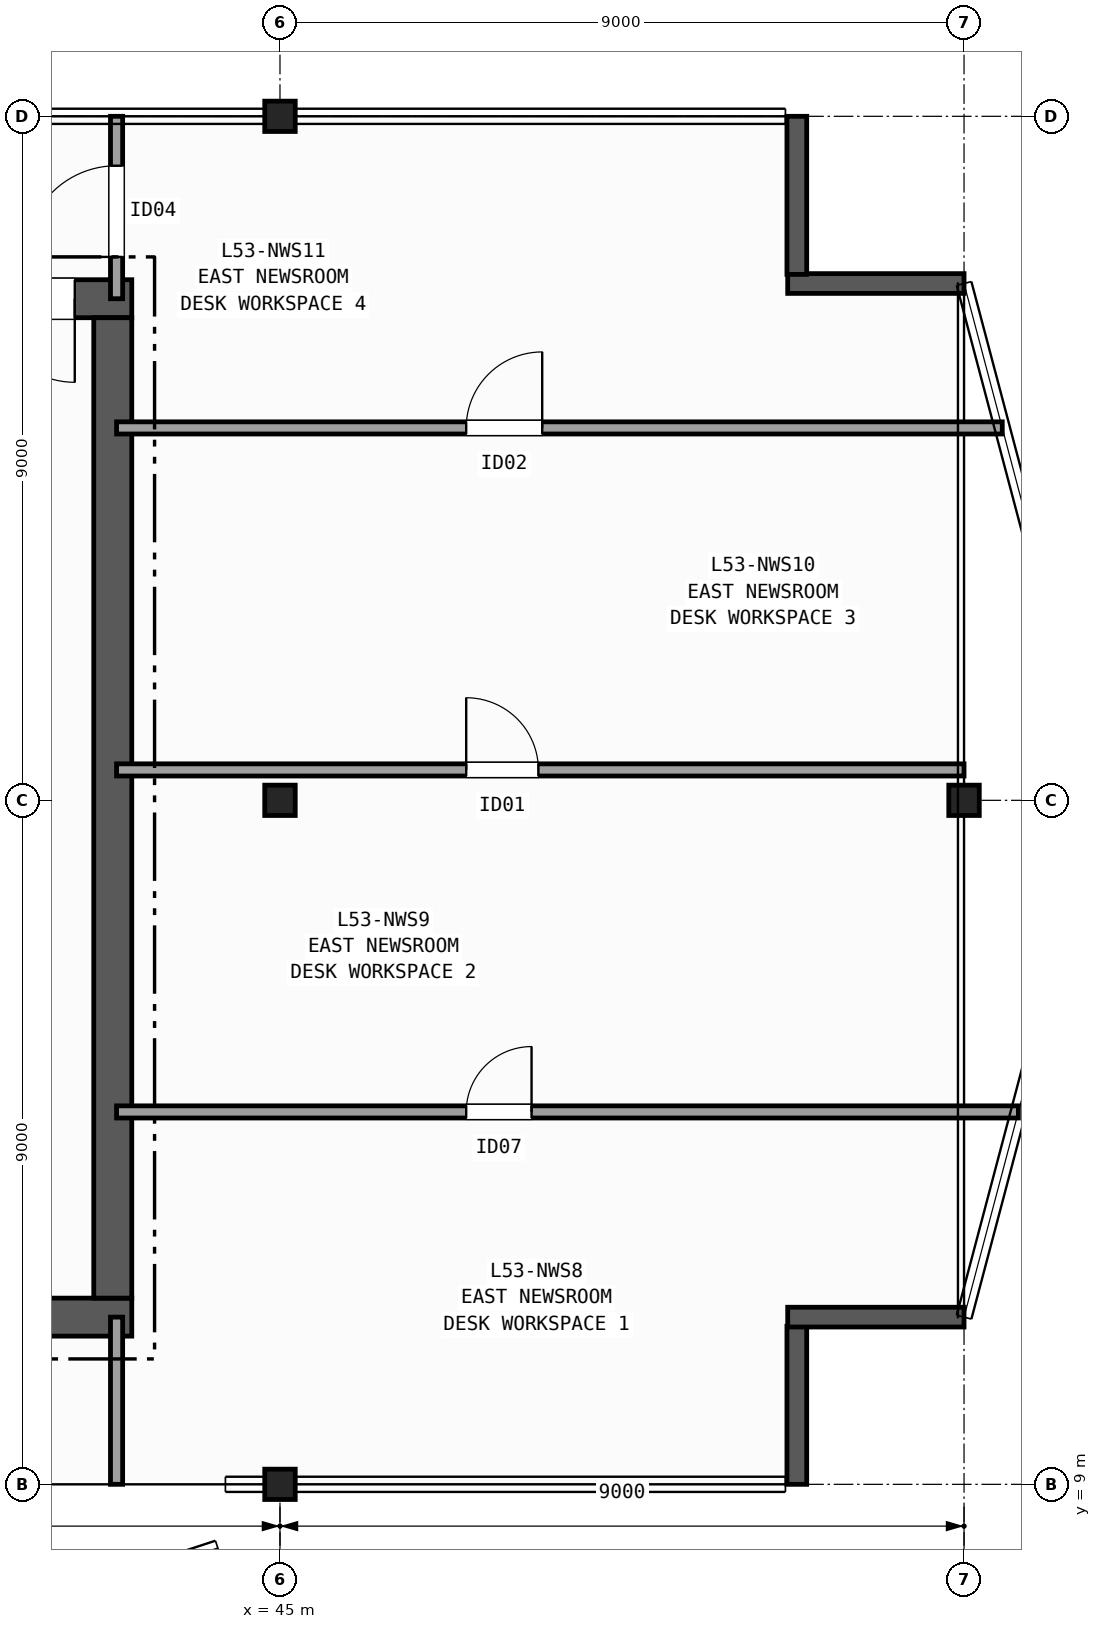
"""IFC4 building model, lengths in metres.
Left out: names, types, materials, properties, quantities, classifications, styles, units other than length and angle.
Written with IfcOpenShell. Run it as: python <this file> out.ifc"""

import sys

from ifc_helpers import new_model, si_unit, direction, frame, frame_2d, origin, origin_2d, place, context, subcontext, project, spatial, rectangle, i_section, extrude, element, fill, save


model = new_model("IFC4")
c1 = context("Model", 3, precision=1e-05, world=origin(), true_north=direction((0.0, 1.0)))
c2 = subcontext(c1, "Body", "Model", "MODEL_VIEW")
j1 = project(units=[si_unit("LENGTHUNIT", "METRE"), si_unit("PLANEANGLEUNIT", "RADIAN")], contexts=[c1])
p1 = place(None, origin())
s1 = spatial("IfcSite", under=j1, at=p1, CompositionType="ELEMENT")
p2 = place(p1, origin())
s2 = spatial("IfcBuilding", under=s1, at=p2, CompositionType="ELEMENT")
p3 = place(p2, frame((0.0, 0.0, 213.6)))
s3 = spatial("IfcBuildingStorey", under=s2, at=p3, CompositionType="ELEMENT", Elevation=213.6)
for number, where, z_axis, x_axis in (
    (1, (45.0, 9.0, 0.0), (0.0, 0.0, 1.0), (1.0, 0.0, 0.0)),
    (2, (45.0, 18.0, 0.0), (0.0, 0.0, 1.0), (1.0, 0.0, 0.0)),
    (3, (45.0, 27.0, 0.0), (0.0, 0.0, 1.0), (1.0, 0.0, 0.0)),
    (4, (54.0, 18.0, 0.0), (0.0, 0.0, 1.0), (1.0, 0.0, 0.0)),
):
    element("IfcColumn", number, at=place(p3, frame(where, z_axis=z_axis, x_axis=x_axis)), inside=s3, PredefinedType="COLUMN", context=c2, shape_type="SweptSolid", body=[
        extrude(i_section(OverallWidth=0.401, OverallDepth=0.399, WebThickness=0.025, FlangeThickness=0.04, FilletRadius=0.015, at=origin_2d()), origin(), (0.0, 0.0, 1.0), 3.7),
    ])
p4 = place(p3, frame((51.8, 9.0, 0.0), z_axis=(0.0, 0.0, 1.0), x_axis=(0.0, 1.0, 0.0)))
e5 = element("IfcWall", 5, at=p4, inside=s3, PredefinedType="SOLIDWALL", context=c2, shape_type="SweptSolid", body=[
    extrude(rectangle(XDim=2.08, YDim=0.26, at=frame_2d((1.04, 0.0))), origin(), (0.0, 0.0, 1.0), 3.42),
])
for number, where, z_axis, x_axis in (
    (6, (51.68, 11.2, 0.0), (0.0, 0.0, 1.0), (1.0, 0.0, 0.0)),
    (7, (54.0, 24.8, 0.0), (0.0, 0.0, 1.0), (-1.0, 0.0, 0.0)),
):
    element("IfcWall", number, at=place(p3, frame(where, z_axis=z_axis, x_axis=x_axis)), inside=s3, PredefinedType="SOLIDWALL", context=c2, shape_type="SweptSolid", body=[
        extrude(rectangle(XDim=2.32, YDim=0.26, at=frame_2d((1.16, 0.0))), origin(), (0.0, 0.0, 1.0), 3.42),
    ])
p5 = place(p3, frame((51.8, 24.92, 0.0), z_axis=(0.0, 0.0, 1.0), x_axis=(0.0, 1.0, 0.0)))
e8 = element("IfcWall", 8, at=p5, inside=s3, PredefinedType="SOLIDWALL", context=c2, shape_type="SweptSolid", body=[
    extrude(rectangle(XDim=2.08, YDim=0.26, at=frame_2d((1.04, 0.0))), origin(), (0.0, 0.0, 1.0), 3.42),
])
p6 = place(p3, frame((29.15, 11.2, 0.0), z_axis=(0.0, 0.0, 1.0), x_axis=(1.0, 0.0, 0.0)))
e9 = element("IfcWall", 9, at=p6, inside=s3, PredefinedType="SHEAR", context=c2, shape_type="SweptSolid", body=[
    extrude(rectangle(XDim=13.9, YDim=0.5, at=frame_2d((6.95, 0.0))), origin(), (0.0, 0.0, 1.0), 3.42),
])
p7 = place(p3, frame((43.05, 24.6, 0.0), z_axis=(0.0, 0.0, 1.0), x_axis=(-1.0, 0.0, 0.0)))
e10 = element("IfcWall", 10, at=p7, inside=s3, PredefinedType="SHEAR", context=c2, shape_type="SweptSolid", body=[
    extrude(rectangle(XDim=13.9, YDim=0.5, at=frame_2d((6.95, 0.0))), origin(), (0.0, 0.0, 1.0), 3.42),
])
p8 = place(p7, frame((0.75, 0.0, 0.0)))
e11 = element("IfcOpeningElement", 11, at=p8, cuts=e10, PredefinedType="OPENING", context=c2, shape_type="SweptSolid", body=[
    extrude(rectangle(XDim=1.1, YDim=2.15, at=frame_2d((0.55, 1.075))), frame((0.0, 0.26, 0.0), z_axis=(0.0, -1.0, 0.0), x_axis=(1.0, 0.0, 0.0)), (0.0, 0.0, 1.0), 0.52),
])
p9 = place(p7, frame((2.25, 0.0, 0.0)))
e12 = element("IfcOpeningElement", 12, at=p9, cuts=e10, PredefinedType="OPENING", context=c2, shape_type="SweptSolid", body=[
    extrude(rectangle(XDim=0.9, YDim=2.1, at=frame_2d((0.45, 1.05))), frame((0.0, 0.26, 0.0), z_axis=(0.0, -1.0, 0.0), x_axis=(1.0, 0.0, 0.0)), (0.0, 0.0, 1.0), 0.52),
])
p10 = place(p7, frame((3.55, 0.0, 0.0)))
e13 = element("IfcOpeningElement", 13, at=p10, cuts=e10, PredefinedType="OPENING", context=c2, shape_type="SweptSolid", body=[
    extrude(rectangle(XDim=0.9, YDim=2.1, at=frame_2d((0.45, 1.05))), frame((0.0, 0.26, 0.0), z_axis=(0.0, -1.0, 0.0), x_axis=(1.0, 0.0, 0.0)), (0.0, 0.0, 1.0), 0.52),
])
p11 = place(p7, frame((4.9, 0.0, 0.0)))
e14 = element("IfcOpeningElement", 14, at=p11, cuts=e10, PredefinedType="OPENING", context=c2, shape_type="SweptSolid", body=[
    extrude(rectangle(XDim=0.9, YDim=2.1, at=frame_2d((0.45, 1.05))), frame((0.0, 0.26, 0.0), z_axis=(0.0, -1.0, 0.0), x_axis=(1.0, 0.0, 0.0)), (0.0, 0.0, 1.0), 0.52),
])
p12 = place(p3, frame((42.8, 11.45, 0.0), z_axis=(0.0, 0.0, 1.0), x_axis=(0.0, 1.0, 0.0)))
e15 = element("IfcWall", 15, at=p12, inside=s3, PredefinedType="SHEAR", context=c2, shape_type="SweptSolid", body=[
    extrude(rectangle(XDim=12.9, YDim=0.5, at=frame_2d((6.45, 0.0))), origin(), (0.0, 0.0, 1.0), 3.42),
])
p13 = place(p3, frame((42.85, 9.0, 0.0), z_axis=(0.0, 0.0, 1.0), x_axis=(0.0, 1.0, 0.0)))
e16 = element("IfcWall", 16, at=p13, inside=s3, PredefinedType="PARTITIONING", context=c2, shape_type="SweptSolid", body=[
    extrude(rectangle(XDim=2.2, YDim=0.16, at=frame_2d((1.1, 0.0))), origin(), (0.0, 0.0, 1.0), 2.707),
])
p14 = place(p3, frame((42.85, 24.6, 0.0), z_axis=(0.0, 0.0, 1.0), x_axis=(0.0, 1.0, 0.0)))
e17 = element("IfcWall", 17, at=p14, inside=s3, PredefinedType="PARTITIONING", context=c2, shape_type="SweptSolid", body=[
    extrude(rectangle(XDim=2.4, YDim=0.16, at=frame_2d((1.2, 0.0))), origin(), (0.0, 0.0, 1.0), 2.707),
])
p15 = place(p14, frame((0.55, 0.0, 0.0)))
e18 = element("IfcOpeningElement", 18, at=p15, cuts=e17, PredefinedType="OPENING", context=c2, shape_type="SweptSolid", body=[
    extrude(rectangle(XDim=1.2, YDim=2.15, at=frame_2d((0.6, 1.075))), frame((0.0, 0.09, 0.0), z_axis=(0.0, -1.0, 0.0), x_axis=(1.0, 0.0, 0.0)), (0.0, 0.0, 1.0), 0.18),
])
p16 = place(p3, frame((42.85, 13.9, 0.0), z_axis=(0.0, 0.0, 1.0), x_axis=(1.0, 0.0, 0.0)))
e19 = element("IfcWall", 19, at=p16, inside=s3, PredefinedType="PARTITIONING", context=c2, shape_type="SweptSolid", body=[
    extrude(rectangle(XDim=11.865, YDim=0.16, at=frame_2d((5.933, 0.0))), origin(), (0.0, 0.0, 1.0), 3.42),
])
p17 = place(p16, frame((4.6, 0.0, 0.0)))
e20 = element("IfcOpeningElement", 20, at=p17, cuts=e19, PredefinedType="OPENING", context=c2, shape_type="SweptSolid", body=[
    extrude(rectangle(XDim=0.86, YDim=2.05, at=frame_2d((0.43, 1.025))), frame((0.0, 0.09, 0.0), z_axis=(0.0, -1.0, 0.0), x_axis=(1.0, 0.0, 0.0)), (0.0, 0.0, 1.0), 0.18),
])
p18 = place(p3, frame((42.85, 18.4, 0.0), z_axis=(0.0, 0.0, 1.0), x_axis=(1.0, 0.0, 0.0)))
e21 = element("IfcWall", 21, at=p18, inside=s3, PredefinedType="PARTITIONING", context=c2, shape_type="SweptSolid", body=[
    extrude(rectangle(XDim=11.15, YDim=0.16, at=frame_2d((5.575, 0.0))), origin(), (0.0, 0.0, 1.0), 3.42),
])
p19 = place(p18, frame((4.6, 0.0, 0.0)))
e22 = element("IfcOpeningElement", 22, at=p19, cuts=e21, PredefinedType="OPENING", context=c2, shape_type="SweptSolid", body=[
    extrude(rectangle(XDim=0.95, YDim=2.1, at=frame_2d((0.475, 1.05))), frame((0.0, 0.09, 0.0), z_axis=(0.0, -1.0, 0.0), x_axis=(1.0, 0.0, 0.0)), (0.0, 0.0, 1.0), 0.18),
])
p20 = place(p3, frame((42.85, 22.9, 0.0), z_axis=(0.0, 0.0, 1.0), x_axis=(1.0, 0.0, 0.0)))
e23 = element("IfcWall", 23, at=p20, inside=s3, PredefinedType="PARTITIONING", context=c2, shape_type="SweptSolid", body=[
    extrude(rectangle(XDim=11.653, YDim=0.16, at=frame_2d((5.826, 0.0))), origin(), (0.0, 0.0, 1.0), 3.42),
])
p21 = place(p20, frame((4.6, 0.0, 0.0)))
e24 = element("IfcOpeningElement", 24, at=p21, cuts=e23, PredefinedType="OPENING", context=c2, shape_type="SweptSolid", body=[
    extrude(rectangle(XDim=1.0, YDim=2.1, at=frame_2d((0.5, 1.05))), frame((0.0, 0.09, 0.0), z_axis=(0.0, -1.0, 0.0), x_axis=(1.0, 0.0, 0.0)), (0.0, 0.0, 1.0), 0.18),
])
p22 = place(p8, origin())
e25 = element("IfcDoor", 25, at=p22, inside=s3, OperationType="SINGLE_SWING_LEFT", PredefinedType="DOOR", context=c2, shape_type="SweptSolid", body=[
    extrude(rectangle(XDim=1.1, YDim=2.15, at=frame_2d((0.55, 1.075))), frame((0.0, 0.025, 0.0), z_axis=(0.0, -1.0, 0.0), x_axis=(1.0, 0.0, 0.0)), (0.0, 0.0, 1.0), 0.05),
])
fill(e11, e25)
p23 = place(p15, origin())
e26 = element("IfcDoor", 26, at=p23, inside=s3, OperationType="SINGLE_SWING_LEFT", PredefinedType="DOOR", context=c2, shape_type="SweptSolid", body=[
    extrude(rectangle(XDim=1.2, YDim=2.15, at=frame_2d((0.6, 1.075))), frame((0.0, 0.025, 0.0), z_axis=(0.0, -1.0, 0.0), x_axis=(1.0, 0.0, 0.0)), (0.0, 0.0, 1.0), 0.05),
])
fill(e18, e26)
p24 = place(p17, origin())
e27 = element("IfcDoor", 27, at=p24, inside=s3, OperationType="SINGLE_SWING_RIGHT", PredefinedType="DOOR", context=c2, shape_type="SweptSolid", body=[
    extrude(rectangle(XDim=0.86, YDim=2.05, at=frame_2d((0.43, 1.025))), frame((0.0, 0.025, 0.0), z_axis=(0.0, -1.0, 0.0), x_axis=(1.0, 0.0, 0.0)), (0.0, 0.0, 1.0), 0.05),
])
fill(e20, e27)
p25 = place(p19, origin())
e28 = element("IfcDoor", 28, at=p25, inside=s3, OperationType="SINGLE_SWING_LEFT", PredefinedType="DOOR", context=c2, shape_type="SweptSolid", body=[
    extrude(rectangle(XDim=0.95, YDim=2.1, at=frame_2d((0.475, 1.05))), frame((0.0, 0.025, 0.0), z_axis=(0.0, -1.0, 0.0), x_axis=(1.0, 0.0, 0.0)), (0.0, 0.0, 1.0), 0.05),
])
fill(e22, e28)
p26 = place(p21, origin())
e29 = element("IfcDoor", 29, at=p26, inside=s3, OperationType="SINGLE_SWING_RIGHT", PredefinedType="DOOR", context=c2, shape_type="SweptSolid", body=[
    extrude(rectangle(XDim=1.0, YDim=2.1, at=frame_2d((0.5, 1.05))), frame((0.0, 0.025, 0.0), z_axis=(0.0, -1.0, 0.0), x_axis=(1.0, 0.0, 0.0)), (0.0, 0.0, 1.0), 0.05),
])
fill(e24, e29)
save(model, sys.argv[1])
